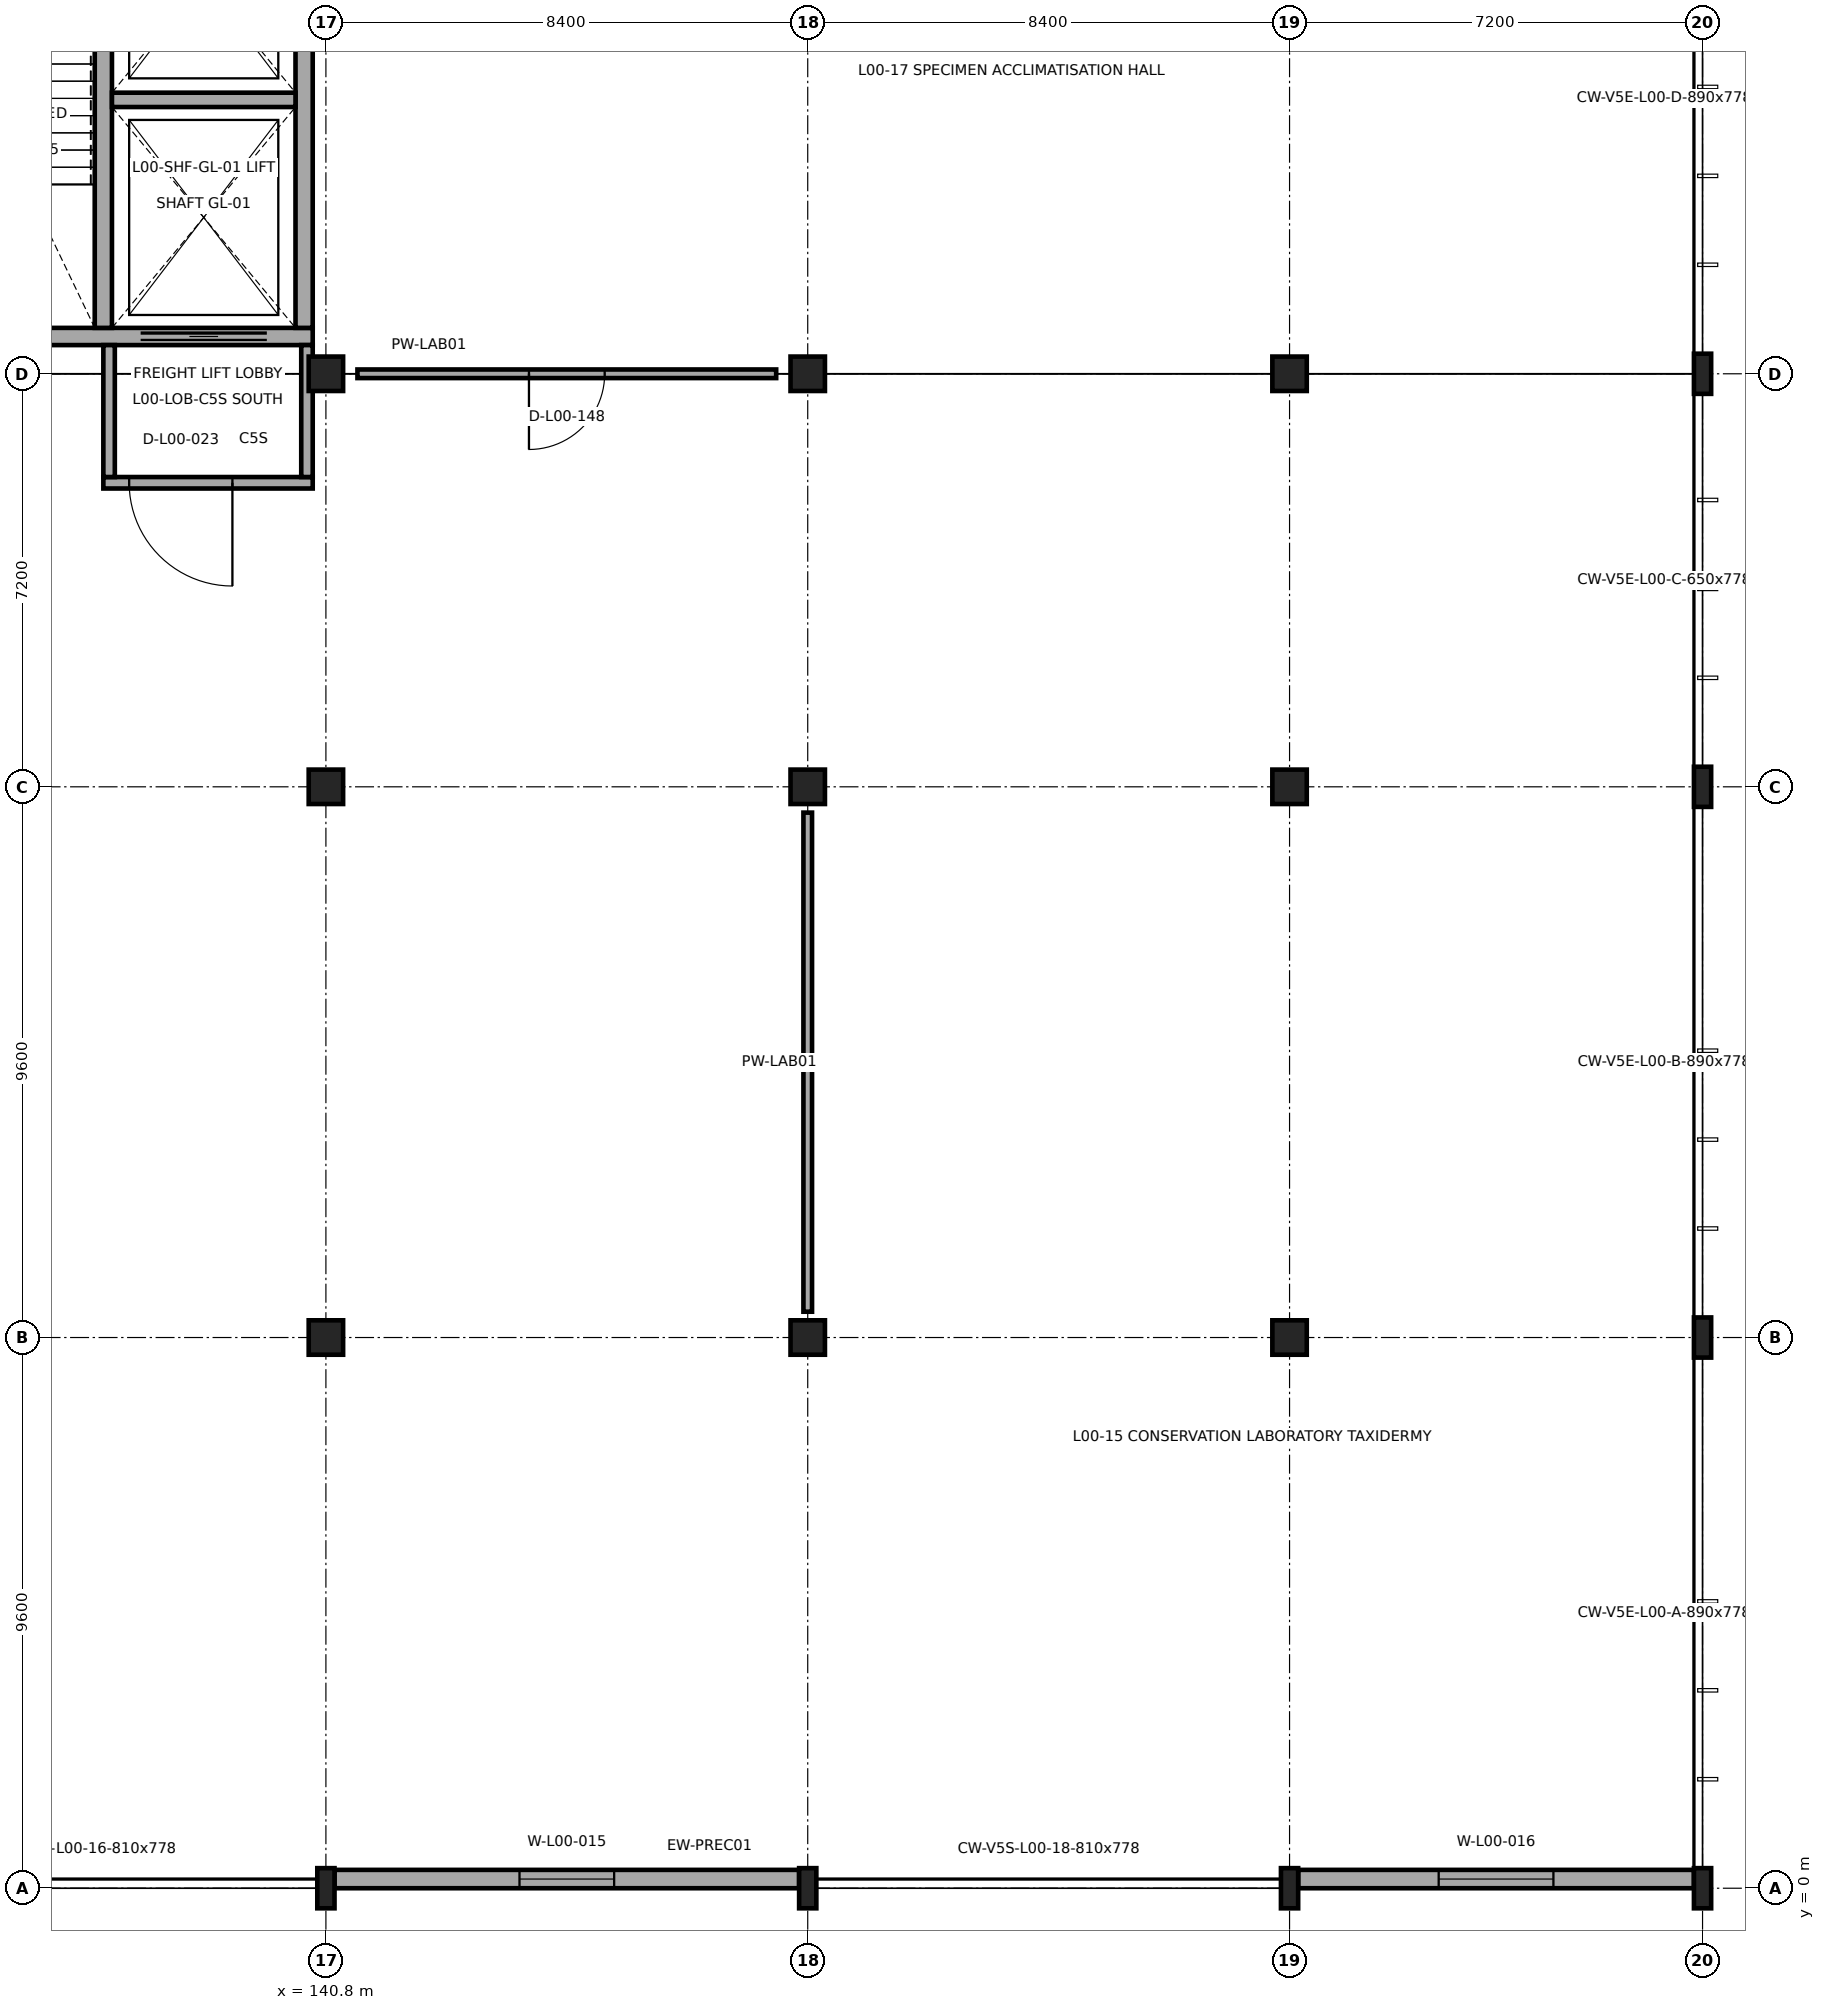
"""IFC4 building model, lengths in metres.
Left out: names, types, materials, properties, quantities, classifications, styles, units other than length and angle.
Written with IfcOpenShell. Run it as: python <this file> out.ifc"""

import sys

from ifc_helpers import new_model, si_unit, direction, frame, frame_2d, origin, origin_2d, place, context, subcontext, project, spatial, rectangle, i_section, extrude, element, fill, save


model = new_model("IFC4")
c1 = context("Model", 3, precision=1e-05, world=origin(), true_north=direction((0.0, 1.0)))
c2 = subcontext(c1, "Body", "Model", "MODEL_VIEW")
j1 = project(units=[si_unit("LENGTHUNIT", "METRE"), si_unit("PLANEANGLEUNIT", "RADIAN")], contexts=[c1])
p1 = place(None, origin())
s1 = spatial("IfcSite", under=j1, at=p1, CompositionType="ELEMENT")
p2 = place(p1, origin())
s2 = spatial("IfcBuilding", under=s1, at=p2, CompositionType="ELEMENT")
p3 = place(p2, origin())
s3 = spatial("IfcBuildingStorey", under=s2, at=p3, CompositionType="ELEMENT", Elevation=0.0)
p4 = place(p3, frame((140.8, 0.0, 0.0), z_axis=(0.0, 0.0, 1.0), x_axis=(1.0, 0.0, 0.0)))
e1 = element("IfcColumn", 1, at=p4, inside=s3, PredefinedType="COLUMN", context=c2, shape_type="SweptSolid", body=[
    extrude(i_section(OverallWidth=0.3, OverallDepth=0.7, WebThickness=0.017, FlangeThickness=0.032, FilletRadius=0.027, at=origin_2d()), origin(), (0.0, 0.0, 1.0), 8.4),
])
for number, where, z_axis, x_axis in (
    (2, (140.8, 9.6, 0.0), (0.0, 0.0, 1.0), (1.0, 0.0, 0.0)),
    (3, (140.8, 19.2, 0.0), (0.0, 0.0, 1.0), (1.0, 0.0, 0.0)),
    (4, (140.8, 26.4, 0.0), (0.0, 0.0, 1.0), (1.0, 0.0, 0.0)),
):
    element("IfcColumn", number, at=place(p3, frame(where, z_axis=z_axis, x_axis=x_axis)), inside=s3, PredefinedType="COLUMN", context=c2, shape_type="SweptSolid", body=[
        extrude(rectangle(XDim=0.6, YDim=0.6, at=origin_2d()), origin(), (0.0, 0.0, 1.0), 8.4),
    ])
p5 = place(p3, frame((149.2, 0.0, 0.0), z_axis=(0.0, 0.0, 1.0), x_axis=(1.0, 0.0, 0.0)))
e5 = element("IfcColumn", 5, at=p5, inside=s3, PredefinedType="COLUMN", context=c2, shape_type="SweptSolid", body=[
    extrude(i_section(OverallWidth=0.3, OverallDepth=0.7, WebThickness=0.017, FlangeThickness=0.032, FilletRadius=0.027, at=origin_2d()), origin(), (0.0, 0.0, 1.0), 8.4),
])
for number, where, z_axis, x_axis in (
    (6, (149.2, 9.6, 0.0), (0.0, 0.0, 1.0), (1.0, 0.0, 0.0)),
    (7, (149.2, 19.2, 0.0), (0.0, 0.0, 1.0), (1.0, 0.0, 0.0)),
    (8, (149.2, 26.4, 0.0), (0.0, 0.0, 1.0), (1.0, 0.0, 0.0)),
):
    element("IfcColumn", number, at=place(p3, frame(where, z_axis=z_axis, x_axis=x_axis)), inside=s3, PredefinedType="COLUMN", context=c2, shape_type="SweptSolid", body=[
        extrude(rectangle(XDim=0.6, YDim=0.6, at=origin_2d()), origin(), (0.0, 0.0, 1.0), 8.4),
    ])
p6 = place(p3, frame((157.6, 0.0, 0.0), z_axis=(0.0, 0.0, 1.0), x_axis=(1.0, 0.0, 0.0)))
e9 = element("IfcColumn", 9, at=p6, inside=s3, PredefinedType="COLUMN", context=c2, shape_type="SweptSolid", body=[
    extrude(i_section(OverallWidth=0.3, OverallDepth=0.7, WebThickness=0.017, FlangeThickness=0.032, FilletRadius=0.027, at=origin_2d()), origin(), (0.0, 0.0, 1.0), 8.4),
])
for number, where, z_axis, x_axis in (
    (10, (157.6, 9.6, 0.0), (0.0, 0.0, 1.0), (1.0, 0.0, 0.0)),
    (11, (157.6, 19.2, 0.0), (0.0, 0.0, 1.0), (1.0, 0.0, 0.0)),
    (12, (157.6, 26.4, 0.0), (0.0, 0.0, 1.0), (1.0, 0.0, 0.0)),
):
    element("IfcColumn", number, at=place(p3, frame(where, z_axis=z_axis, x_axis=x_axis)), inside=s3, PredefinedType="COLUMN", context=c2, shape_type="SweptSolid", body=[
        extrude(rectangle(XDim=0.6, YDim=0.6, at=origin_2d()), origin(), (0.0, 0.0, 1.0), 8.4),
    ])
for number, where, z_axis, x_axis in (
    (13, (164.8, 0.0, 0.0), (0.0, 0.0, 1.0), (1.0, 0.0, 0.0)),
    (14, (164.8, 9.6, 0.0), (0.0, 0.0, 1.0), (1.0, 0.0, 0.0)),
    (15, (164.8, 19.2, 0.0), (0.0, 0.0, 1.0), (1.0, 0.0, 0.0)),
    (16, (164.8, 26.4, 0.0), (0.0, 0.0, 1.0), (1.0, 0.0, 0.0)),
):
    element("IfcColumn", number, at=place(p3, frame(where, z_axis=z_axis, x_axis=x_axis)), inside=s3, PredefinedType="COLUMN", context=c2, shape_type="SweptSolid", body=[
        extrude(i_section(OverallWidth=0.3, OverallDepth=0.7, WebThickness=0.017, FlangeThickness=0.032, FilletRadius=0.027, at=origin_2d()), origin(), (0.0, 0.0, 1.0), 8.4),
    ])
p7 = place(p3, frame((140.95, 0.16, 0.0), z_axis=(0.0, 0.0, 1.0), x_axis=(1.0, 0.0, 0.0)))
e17 = element("IfcWall", 17, at=p7, inside=s3, PredefinedType="SOLIDWALL", context=c2, shape_type="SweptSolid", body=[
    extrude(rectangle(XDim=8.1, YDim=0.32, at=frame_2d((4.05, 0.0))), origin(), (0.0, 0.0, 1.0), 7.78),
])
p8 = place(p7, frame((3.225, 0.0, 1.0)))
e18 = element("IfcOpeningElement", 18, at=p8, cuts=e17, PredefinedType="OPENING", context=c2, shape_type="SweptSolid", body=[
    extrude(rectangle(XDim=1.65, YDim=2.25, at=frame_2d((0.825, 1.125))), frame((0.0, 0.17, 0.0), z_axis=(0.0, -1.0, 0.0), x_axis=(1.0, 0.0, 0.0)), (0.0, 0.0, 1.0), 0.34),
])
p9 = place(p3, frame((157.75, 0.16, 0.0), z_axis=(0.0, 0.0, 1.0), x_axis=(1.0, 0.0, 0.0)))
e19 = element("IfcWall", 19, at=p9, inside=s3, PredefinedType="SOLIDWALL", context=c2, shape_type="SweptSolid", body=[
    extrude(rectangle(XDim=6.9, YDim=0.32, at=frame_2d((3.45, 0.0))), origin(), (0.0, 0.0, 1.0), 7.78),
])
p10 = place(p9, frame((2.45, 0.0, 1.0)))
e20 = element("IfcOpeningElement", 20, at=p10, cuts=e19, PredefinedType="OPENING", context=c2, shape_type="SweptSolid", body=[
    extrude(rectangle(XDim=2.0, YDim=2.05, at=frame_2d((1.0, 1.025))), frame((0.0, 0.17, 0.0), z_axis=(0.0, -1.0, 0.0), x_axis=(1.0, 0.0, 0.0)), (0.0, 0.0, 1.0), 0.34),
])
p11 = place(p3, frame((132.63, 27.05, 0.0), z_axis=(0.0, 0.0, 1.0), x_axis=(1.0, 0.0, 0.0)))
e21 = element("IfcWall", 21, at=p11, inside=s3, PredefinedType="SHEAR", context=c2, shape_type="SweptSolid", body=[
    extrude(rectangle(XDim=7.94, YDim=0.3, at=frame_2d((3.97, 0.0))), origin(), (0.0, 0.0, 1.0), 8.15),
])
p12 = place(p11, frame((4.94, 0.0, 0.0)))
e22 = element("IfcOpeningElement", 22, at=p12, cuts=e21, PredefinedType="OPENING", context=c2, shape_type="SweptSolid", body=[
    extrude(rectangle(XDim=2.2, YDim=2.6, at=frame_2d((1.1, 1.3))), frame((0.0, 0.16, 0.0), z_axis=(0.0, -1.0, 0.0), x_axis=(1.0, 0.0, 0.0)), (0.0, 0.0, 1.0), 0.32),
])
for number, where, z_axis, x_axis in (
    (23, (140.42, 27.2, 0.0), (0.0, 0.0, 1.0), (0.0, 1.0, 0.0)),
    (24, (136.92, 27.2, 0.0), (0.0, 0.0, 1.0), (0.0, 1.0, 0.0)),
):
    element("IfcWall", number, at=place(p3, frame(where, z_axis=z_axis, x_axis=x_axis)), inside=s3, PredefinedType="SHEAR", context=c2, shape_type="SweptSolid", body=[
        extrude(rectangle(XDim=8.0, YDim=0.3, at=frame_2d((4.0, 0.0))), origin(), (0.0, 0.0, 1.0), 8.15),
    ])
p13 = place(p3, frame((137.07, 31.175, 0.0), z_axis=(0.0, 0.0, 1.0), x_axis=(1.0, 0.0, 0.0)))
e25 = element("IfcWall", 25, at=p13, inside=s3, PredefinedType="SHEAR", context=c2, shape_type="SweptSolid", body=[
    extrude(rectangle(XDim=3.2, YDim=0.25, at=frame_2d((1.6, 0.0))), origin(), (0.0, 0.0, 1.0), 8.15),
])
p14 = place(p3, frame((140.57, 24.5, 0.0), z_axis=(0.0, 0.0, 1.0), x_axis=(-1.0, 0.0, 0.0)))
e26 = element("IfcWall", 26, at=p14, inside=s3, PredefinedType="SOLIDWALL", context=c2, shape_type="SweptSolid", body=[
    extrude(rectangle(XDim=3.65, YDim=0.2, at=frame_2d((1.825, 0.0))), origin(), (0.0, 0.0, 1.0), 8.135),
])
p15 = place(p14, frame((1.4, 0.0, 0.0)))
e27 = element("IfcOpeningElement", 27, at=p15, cuts=e26, PredefinedType="OPENING", context=c2, shape_type="SweptSolid", body=[
    extrude(rectangle(XDim=1.8, YDim=2.2, at=frame_2d((0.9, 1.1))), frame((0.0, 0.11, 0.0), z_axis=(0.0, -1.0, 0.0), x_axis=(1.0, 0.0, 0.0)), (0.0, 0.0, 1.0), 0.22),
])
for number, where, z_axis, x_axis in (
    (28, (137.02, 24.6, 0.0), (0.0, 0.0, 1.0), (0.0, 1.0, 0.0)),
    (29, (140.47, 26.9, 0.0), (0.0, 0.0, 1.0), (0.0, -1.0, 0.0)),
):
    element("IfcWall", number, at=place(p3, frame(where, z_axis=z_axis, x_axis=x_axis)), inside=s3, PredefinedType="SOLIDWALL", context=c2, shape_type="SweptSolid", body=[
        extrude(rectangle(XDim=2.3, YDim=0.2, at=frame_2d((1.15, 0.0))), origin(), (0.0, 0.0, 1.0), 7.582),
    ])
p16 = place(p3, frame((149.2, 10.05, 0.0), z_axis=(0.0, 0.0, 1.0), x_axis=(0.0, 1.0, 0.0)))
e30 = element("IfcWall", 30, at=p16, inside=s3, PredefinedType="PARTITIONING", context=c2, shape_type="SweptSolid", body=[
    extrude(rectangle(XDim=8.7, YDim=0.15, at=frame_2d((4.35, 0.0))), origin(), (0.0, 0.0, 1.0), 7.532),
])
p17 = place(p3, frame((141.35, 26.4, 0.0), z_axis=(0.0, 0.0, 1.0), x_axis=(1.0, 0.0, 0.0)))
e31 = element("IfcWall", 31, at=p17, inside=s3, PredefinedType="PARTITIONING", context=c2, shape_type="SweptSolid", body=[
    extrude(rectangle(XDim=7.3, YDim=0.15, at=frame_2d((3.65, 0.0))), origin(), (0.0, 0.0, 1.0), 7.582),
])
p18 = place(p17, frame((2.99, 0.0, 0.0)))
e32 = element("IfcOpeningElement", 32, at=p18, cuts=e31, PredefinedType="OPENING", context=c2, shape_type="SweptSolid", body=[
    extrude(rectangle(XDim=1.32, YDim=2.2, at=frame_2d((0.66, 1.1))), frame((0.0, 0.085, 0.0), z_axis=(0.0, -1.0, 0.0), x_axis=(1.0, 0.0, 0.0)), (0.0, 0.0, 1.0), 0.17),
])
p19 = place(p8, origin())
e33 = element("IfcWindow", 33, at=p19, inside=s3, PartitioningType="SINGLE_PANEL", PredefinedType="WINDOW", context=c2, shape_type="SweptSolid", body=[
    extrude(rectangle(XDim=1.65, YDim=2.25, at=frame_2d((0.825, 1.125))), frame((0.0, 0.03, 0.0), z_axis=(0.0, -1.0, 0.0), x_axis=(1.0, 0.0, 0.0)), (0.0, 0.0, 1.0), 0.06),
])
fill(e18, e33)
p20 = place(p10, origin())
e34 = element("IfcWindow", 34, at=p20, inside=s3, PartitioningType="SINGLE_PANEL", PredefinedType="WINDOW", context=c2, shape_type="SweptSolid", body=[
    extrude(rectangle(XDim=2.0, YDim=2.05, at=frame_2d((1.0, 1.025))), frame((0.0, 0.03, 0.0), z_axis=(0.0, -1.0, 0.0), x_axis=(1.0, 0.0, 0.0)), (0.0, 0.0, 1.0), 0.06),
])
fill(e20, e34)
p21 = place(p12, origin())
e35 = element("IfcDoor", 35, at=p21, inside=s3, OperationType="SLIDING_TO_LEFT", PredefinedType="DOOR", context=c2, shape_type="SweptSolid", body=[
    extrude(rectangle(XDim=2.2, YDim=2.6, at=frame_2d((1.1, 1.3))), frame((0.0, 0.025, 0.0), z_axis=(0.0, -1.0, 0.0), x_axis=(1.0, 0.0, 0.0)), (0.0, 0.0, 1.0), 0.05),
])
fill(e22, e35)
p22 = place(p15, origin())
e36 = element("IfcDoor", 36, at=p22, inside=s3, OperationType="DOUBLE_DOOR_SINGLE_SWING", PredefinedType="DOOR", context=c2, shape_type="SweptSolid", body=[
    extrude(rectangle(XDim=1.8, YDim=2.2, at=frame_2d((0.9, 1.1))), frame((0.0, 0.025, 0.0), z_axis=(0.0, -1.0, 0.0), x_axis=(1.0, 0.0, 0.0)), (0.0, 0.0, 1.0), 0.05),
])
fill(e27, e36)
p23 = place(p18, origin())
e37 = element("IfcDoor", 37, at=p23, inside=s3, OperationType="SINGLE_SWING_RIGHT", PredefinedType="DOOR", context=c2, shape_type="SweptSolid", body=[
    extrude(rectangle(XDim=1.32, YDim=2.2, at=frame_2d((0.66, 1.1))), frame((0.0, 0.025, 0.0), z_axis=(0.0, -1.0, 0.0), x_axis=(1.0, 0.0, 0.0)), (0.0, 0.0, 1.0), 0.05),
])
fill(e32, e37)
save(model, sys.argv[1])
